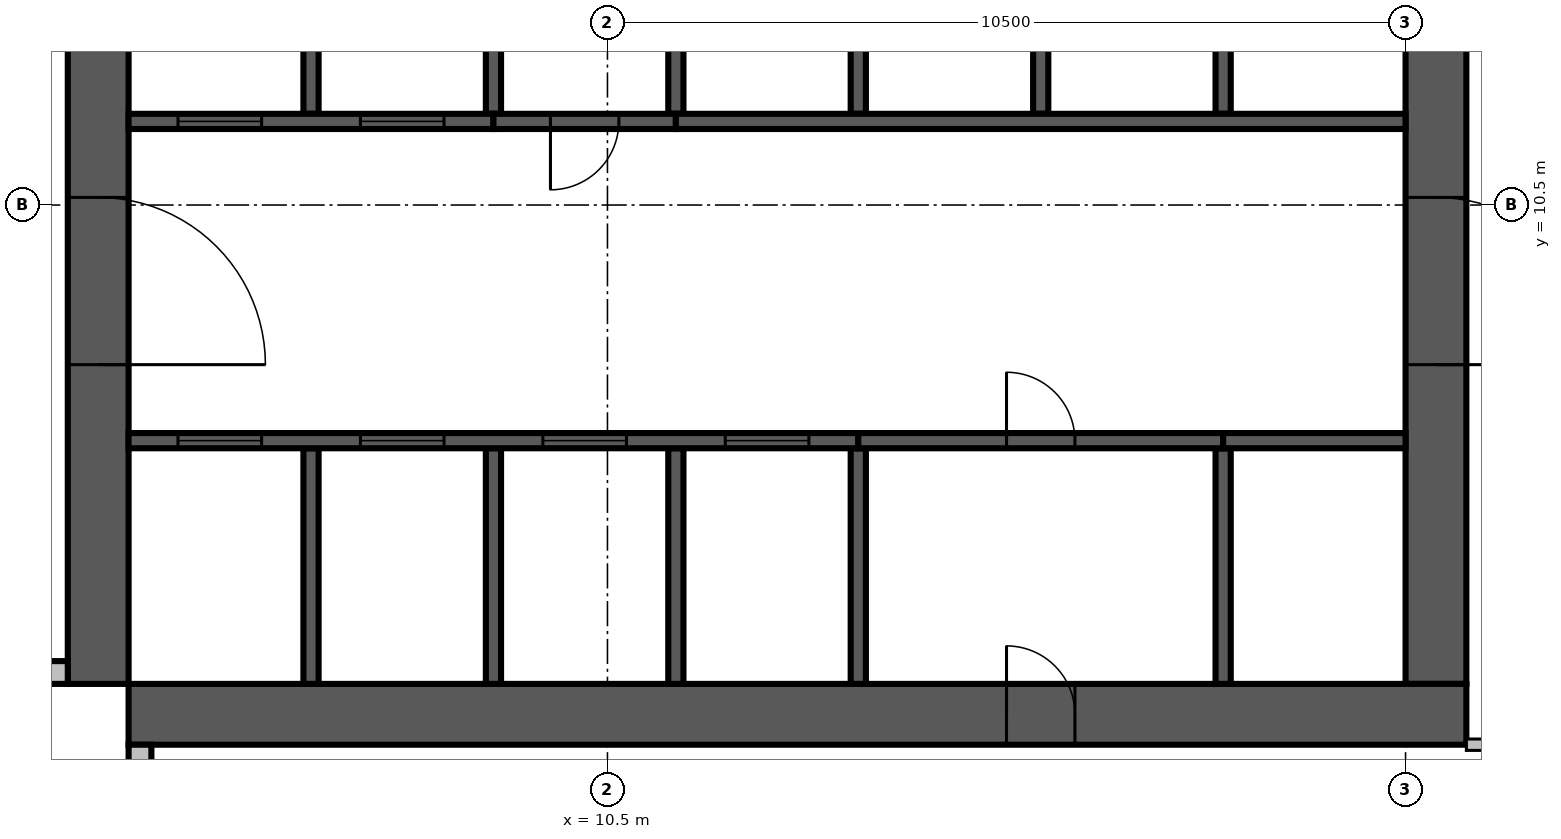
"""IFC4 building model, lengths in metres.
Left out: names, types, materials, properties, quantities, classifications, styles, units other than length and angle.
Written with IfcOpenShell. Run it as: python <this file> out.ifc"""

import sys

from ifc_helpers import new_model, si_unit, direction, frame, frame_2d, origin, place, context, subcontext, project, spatial, rectangle, extrude, source, transform, mapped, element, fill, save


model = new_model("IFC4")
c1 = context("Model", 3, precision=1e-05, world=origin(), true_north=direction((0.0, 1.0)))
c2 = subcontext(c1, "Body", "Model", "MODEL_VIEW")
j1 = project(units=[si_unit("LENGTHUNIT", "METRE"), si_unit("PLANEANGLEUNIT", "RADIAN")], contexts=[c1])
p1 = place(None, origin())
s1 = spatial("IfcSite", under=j1, at=p1, CompositionType="ELEMENT")
p2 = place(p1, origin())
s2 = spatial("IfcBuilding", under=s1, at=p2, CompositionType="ELEMENT")
p3 = place(p2, frame((0.0, 0.0, 250.0)))
s3 = spatial("IfcBuildingStorey", under=s2, at=p3, CompositionType="ELEMENT", Elevation=250.0)
m1 = source(origin(), c2, "Body", "SweptSolid", [
    extrude(rectangle(XDim=17.6, YDim=0.8, at=frame_2d((8.8, 0.0))), origin(), (0.0, 0.0, 1.0), 3.8),
])
p4 = place(p3, frame((3.8, 4.2, 0.0), z_axis=(0.0, 0.0, 1.0), x_axis=(0.0, 1.0, 0.0)))
e1 = element("IfcWall", 1, at=p4, inside=s3, PredefinedType="SHEAR", context=c2, shape_type="MappedRepresentation", body=[
    mapped(m1, transform((0.0, 0.0, 0.0), scale=1.0)),
])
m2 = source(origin(), c2, "Body", "SweptSolid", [
    extrude(rectangle(XDim=2.2, YDim=2.1, at=frame_2d((1.1, 1.05))), frame((0.0, 0.41, 0.0), z_axis=(0.0, -1.0, 0.0), x_axis=(1.0, 0.0, 0.0)), (0.0, 0.0, 1.0), 0.82),
])
p5 = place(p4, frame((4.2, 0.0, 0.0)))
e2 = element("IfcOpeningElement", 2, at=p5, cuts=e1, PredefinedType="OPENING", context=c2, shape_type="MappedRepresentation", body=[
    mapped(m2, transform((0.0, 0.0, 0.0), scale=1.0)),
])
m3 = source(origin(), c2, "Body", "SweptSolid", [
    extrude(rectangle(XDim=0.9, YDim=2.1, at=frame_2d((0.45, 1.05))), frame((0.0, 0.41, 0.0), z_axis=(0.0, -1.0, 0.0), x_axis=(1.0, 0.0, 0.0)), (0.0, 0.0, 1.0), 0.82),
])
p6 = place(p4, frame((10.95, 0.0, 0.0)))
e3 = element("IfcOpeningElement", 3, at=p6, cuts=e1, PredefinedType="OPENING", context=c2, shape_type="MappedRepresentation", body=[
    mapped(m3, transform((0.0, 0.0, 0.0), scale=1.0)),
])
m4 = source(origin(), c2, "Body", "SweptSolid", [
    extrude(rectangle(XDim=16.8, YDim=0.8, at=frame_2d((8.4, 0.0))), origin(), (0.0, 0.0, 1.0), 3.8),
])
p7 = place(p3, frame((21.4, 4.2, 0.0), z_axis=(0.0, 0.0, 1.0), x_axis=(0.0, 1.0, 0.0)))
e4 = element("IfcWall", 4, at=p7, inside=s3, PredefinedType="SHEAR", context=c2, shape_type="MappedRepresentation", body=[
    mapped(m4, transform((0.0, 0.0, 0.0), scale=1.0)),
])
p8 = place(p7, frame((4.2, 0.0, 0.0)))
e5 = element("IfcOpeningElement", 5, at=p8, cuts=e4, PredefinedType="OPENING", context=c2, shape_type="MappedRepresentation", body=[
    mapped(m2, transform((0.0, 0.0, 0.0), scale=1.0)),
])
m5 = source(origin(), c2, "Body", "SweptSolid", [
    extrude(rectangle(XDim=1.2, YDim=2.1, at=frame_2d((0.6, 1.05))), frame((0.0, 0.41, 0.0), z_axis=(0.0, -1.0, 0.0), x_axis=(1.0, 0.0, 0.0)), (0.0, 0.0, 1.0), 0.82),
])
p9 = place(p7, frame((14.7, 0.0, 0.0)))
e6 = element("IfcOpeningElement", 6, at=p9, cuts=e4, PredefinedType="OPENING", context=c2, shape_type="MappedRepresentation", body=[
    mapped(m5, transform((0.0, 0.0, 0.0), scale=1.0)),
])
p10 = place(p3, frame((4.2, 3.8, 0.0), z_axis=(0.0, 0.0, 1.0), x_axis=(1.0, 0.0, 0.0)))
e7 = element("IfcWall", 7, at=p10, inside=s3, PredefinedType="SHEAR", context=c2, shape_type="MappedRepresentation", body=[
    mapped(m1, transform((0.0, 0.0, 0.0), scale=1.0)),
])
p11 = place(p10, frame((11.55, 0.0, 0.0)))
e8 = element("IfcOpeningElement", 8, at=p11, cuts=e7, PredefinedType="OPENING", context=c2, shape_type="MappedRepresentation", body=[
    mapped(m3, transform((0.0, 0.0, 0.0), scale=1.0)),
])
m6 = source(origin(), c2, "Body", "SweptSolid", [
    extrude(rectangle(XDim=3.4, YDim=0.3, at=frame_2d((1.7, 0.0))), origin(), (0.0, 0.0, 1.0), 3.4),
])
p12 = place(p3, frame((0.0, 4.35, 0.0), z_axis=(0.0, 0.0, 1.0), x_axis=(1.0, 0.0, 0.0)))
e9 = element("IfcWall", 9, at=p12, inside=s3, PredefinedType="STANDARD", context=c2, shape_type="MappedRepresentation", body=[
    mapped(m6, transform((0.0, 0.0, 0.0), scale=1.0)),
])
m7 = source(origin(), c2, "Body", "SweptSolid", [
    extrude(rectangle(XDim=1.8, YDim=2.3, at=frame_2d((0.9, 1.15))), frame((0.0, 0.16, 0.0), z_axis=(0.0, -1.0, 0.0), x_axis=(1.0, 0.0, 0.0)), (0.0, 0.0, 1.0), 0.32),
])
p13 = place(p12, frame((1.2, 0.0, 0.6)))
e10 = element("IfcOpeningElement", 10, at=p13, cuts=e9, PredefinedType="OPENING", context=c2, shape_type="MappedRepresentation", body=[
    mapped(m7, transform((0.0, 0.0, 0.0), scale=1.0)),
])
p14 = place(p3, frame((4.35, 3.4, 0.0), z_axis=(0.0, 0.0, 1.0), x_axis=(0.0, -1.0, 0.0)))
e11 = element("IfcWall", 11, at=p14, inside=s3, PredefinedType="STANDARD", context=c2, shape_type="MappedRepresentation", body=[
    mapped(m6, transform((0.0, 0.0, 0.0), scale=1.0)),
])
p15 = place(p14, frame((0.4, 0.0, 0.6)))
e12 = element("IfcOpeningElement", 12, at=p15, cuts=e11, PredefinedType="OPENING", context=c2, shape_type="MappedRepresentation", body=[
    mapped(m7, transform((0.0, 0.0, 0.0), scale=1.0)),
])
m8 = source(origin(), c2, "Body", "SweptSolid", [
    extrude(rectangle(XDim=3.1, YDim=0.2, at=frame_2d((1.55, 0.0))), origin(), (0.0, 0.0, 1.0), 3.8),
])
for number, where, z_axis, x_axis in (
    (13, (6.6, 4.2, 0.0), (0.0, 0.0, 1.0), (0.0, 1.0, 0.0)),
    (14, (9.0, 4.2, 0.0), (0.0, 0.0, 1.0), (0.0, 1.0, 0.0)),
    (15, (11.4, 4.2, 0.0), (0.0, 0.0, 1.0), (0.0, 1.0, 0.0)),
):
    element("IfcWall", number, at=place(p3, frame(where, z_axis=z_axis, x_axis=x_axis)), inside=s3, PredefinedType="SOLIDWALL", context=c2, shape_type="MappedRepresentation", body=[
        mapped(m8, transform((0.0, 0.0, 0.0), scale=1.0)),
    ])
m9 = source(origin(), c2, "Body", "SweptSolid", [
    extrude(rectangle(XDim=3.1, YDim=0.2, at=frame_2d((1.55, 0.0))), origin(), (0.0, 0.0, 1.0), 3.4),
])
for number, where, z_axis, x_axis in (
    (16, (13.8, 4.2, 0.0), (0.0, 0.0, 1.0), (0.0, 1.0, 0.0)),
    (17, (18.6, 4.2, 0.0), (0.0, 0.0, 1.0), (0.0, 1.0, 0.0)),
):
    element("IfcWall", number, at=place(p3, frame(where, z_axis=z_axis, x_axis=x_axis)), inside=s3, PredefinedType="SOLIDWALL", context=c2, shape_type="MappedRepresentation", body=[
        mapped(m9, transform((0.0, 0.0, 0.0), scale=1.0)),
    ])
m10 = source(origin(), c2, "Body", "SweptSolid", [
    extrude(rectangle(XDim=3.0, YDim=0.2, at=frame_2d((1.5, 0.0))), origin(), (0.0, 0.0, 1.0), 3.8),
])
p16 = place(p3, frame((6.6, 11.7, 0.0), z_axis=(0.0, 0.0, 1.0), x_axis=(0.0, 1.0, 0.0)))
e18 = element("IfcWall", 18, at=p16, inside=s3, PredefinedType="SOLIDWALL", context=c2, shape_type="MappedRepresentation", body=[
    mapped(m10, transform((0.0, 0.0, 0.0), scale=1.0)),
])
m11 = source(origin(), c2, "Body", "SweptSolid", [
    extrude(rectangle(XDim=3.0, YDim=0.2, at=frame_2d((1.5, 0.0))), origin(), (0.0, 0.0, 1.0), 3.4),
])
for number, where, z_axis, x_axis in (
    (19, (9.0, 11.7, 0.0), (0.0, 0.0, 1.0), (0.0, 1.0, 0.0)),
    (20, (11.4, 11.7, 0.0), (0.0, 0.0, 1.0), (0.0, 1.0, 0.0)),
):
    element("IfcWall", number, at=place(p3, frame(where, z_axis=z_axis, x_axis=x_axis)), inside=s3, PredefinedType="SOLIDWALL", context=c2, shape_type="MappedRepresentation", body=[
        mapped(m11, transform((0.0, 0.0, 0.0), scale=1.0)),
    ])
for number, where, z_axis, x_axis in (
    (21, (13.8, 11.7, 0.0), (0.0, 0.0, 1.0), (0.0, 1.0, 0.0)),
    (22, (16.2, 11.7, 0.0), (0.0, 0.0, 1.0), (0.0, 1.0, 0.0)),
    (23, (18.6, 11.7, 0.0), (0.0, 0.0, 1.0), (0.0, 1.0, 0.0)),
):
    element("IfcWall", number, at=place(p3, frame(where, z_axis=z_axis, x_axis=x_axis)), inside=s3, PredefinedType="SOLIDWALL", context=c2, shape_type="MappedRepresentation", body=[
        mapped(m10, transform((0.0, 0.0, 0.0), scale=1.0)),
    ])
m12 = source(origin(), c2, "Body", "SweptSolid", [
    extrude(rectangle(XDim=9.6, YDim=0.2, at=frame_2d((4.8, 0.0))), origin(), (0.0, 0.0, 1.0), 3.8),
])
p17 = place(p3, frame((4.2, 7.4, 0.0), z_axis=(0.0, 0.0, 1.0), x_axis=(1.0, 0.0, 0.0)))
e24 = element("IfcWall", 24, at=p17, inside=s3, PredefinedType="SOLIDWALL", context=c2, shape_type="MappedRepresentation", body=[
    mapped(m12, transform((0.0, 0.0, 0.0), scale=1.0)),
])
m13 = source(origin(), c2, "Body", "SweptSolid", [
    extrude(rectangle(XDim=1.1, YDim=2.1, at=frame_2d((0.55, 1.05))), frame((0.0, 0.11, 0.0), z_axis=(0.0, -1.0, 0.0), x_axis=(1.0, 0.0, 0.0)), (0.0, 0.0, 1.0), 0.22),
])
p18 = place(p17, frame((0.65, 0.0, 0.0)))
e25 = element("IfcOpeningElement", 25, at=p18, cuts=e24, PredefinedType="OPENING", context=c2, shape_type="MappedRepresentation", body=[
    mapped(m13, transform((0.0, 0.0, 0.0), scale=1.0)),
])
p19 = place(p17, frame((3.05, 0.0, 0.0)))
e26 = element("IfcOpeningElement", 26, at=p19, cuts=e24, PredefinedType="OPENING", context=c2, shape_type="MappedRepresentation", body=[
    mapped(m13, transform((0.0, 0.0, 0.0), scale=1.0)),
])
p20 = place(p17, frame((5.45, 0.0, 0.0)))
e27 = element("IfcOpeningElement", 27, at=p20, cuts=e24, PredefinedType="OPENING", context=c2, shape_type="MappedRepresentation", body=[
    mapped(m13, transform((0.0, 0.0, 0.0), scale=1.0)),
])
p21 = place(p17, frame((7.85, 0.0, 0.0)))
e28 = element("IfcOpeningElement", 28, at=p21, cuts=e24, PredefinedType="OPENING", context=c2, shape_type="MappedRepresentation", body=[
    mapped(m13, transform((0.0, 0.0, 0.0), scale=1.0)),
])
m14 = source(origin(), c2, "Body", "SweptSolid", [
    extrude(rectangle(XDim=4.8, YDim=0.2, at=frame_2d((2.4, 0.0))), origin(), (0.0, 0.0, 1.0), 3.4),
])
p22 = place(p3, frame((13.8, 7.4, 0.0), z_axis=(0.0, 0.0, 1.0), x_axis=(1.0, 0.0, 0.0)))
e29 = element("IfcWall", 29, at=p22, inside=s3, PredefinedType="SOLIDWALL", context=c2, shape_type="MappedRepresentation", body=[
    mapped(m14, transform((0.0, 0.0, 0.0), scale=1.0)),
])
m15 = source(origin(), c2, "Body", "SweptSolid", [
    extrude(rectangle(XDim=0.9, YDim=2.1, at=frame_2d((0.45, 1.05))), frame((0.0, 0.11, 0.0), z_axis=(0.0, -1.0, 0.0), x_axis=(1.0, 0.0, 0.0)), (0.0, 0.0, 1.0), 0.22),
])
p23 = place(p22, frame((1.95, 0.0, 0.0)))
e30 = element("IfcOpeningElement", 30, at=p23, cuts=e29, PredefinedType="OPENING", context=c2, shape_type="MappedRepresentation", body=[
    mapped(m15, transform((0.0, 0.0, 0.0), scale=1.0)),
])
m16 = source(origin(), c2, "Body", "SweptSolid", [
    extrude(rectangle(XDim=2.4, YDim=0.2, at=frame_2d((1.2, 0.0))), origin(), (0.0, 0.0, 1.0), 3.8),
])
p24 = place(p3, frame((18.6, 7.4, 0.0), z_axis=(0.0, 0.0, 1.0), x_axis=(1.0, 0.0, 0.0)))
e31 = element("IfcWall", 31, at=p24, inside=s3, PredefinedType="SOLIDWALL", context=c2, shape_type="MappedRepresentation", body=[
    mapped(m16, transform((0.0, 0.0, 0.0), scale=1.0)),
])
m17 = source(origin(), c2, "Body", "SweptSolid", [
    extrude(rectangle(XDim=4.8, YDim=0.2, at=frame_2d((2.4, 0.0))), origin(), (0.0, 0.0, 1.0), 3.8),
])
p25 = place(p3, frame((4.2, 11.6, 0.0), z_axis=(0.0, 0.0, 1.0), x_axis=(1.0, 0.0, 0.0)))
e32 = element("IfcWall", 32, at=p25, inside=s3, PredefinedType="SOLIDWALL", context=c2, shape_type="MappedRepresentation", body=[
    mapped(m17, transform((0.0, 0.0, 0.0), scale=1.0)),
])
p26 = place(p25, frame((0.65, 0.0, 0.0)))
e33 = element("IfcOpeningElement", 33, at=p26, cuts=e32, PredefinedType="OPENING", context=c2, shape_type="MappedRepresentation", body=[
    mapped(m13, transform((0.0, 0.0, 0.0), scale=1.0)),
])
p27 = place(p25, frame((3.05, 0.0, 0.0)))
e34 = element("IfcOpeningElement", 34, at=p27, cuts=e32, PredefinedType="OPENING", context=c2, shape_type="MappedRepresentation", body=[
    mapped(m13, transform((0.0, 0.0, 0.0), scale=1.0)),
])
m18 = source(origin(), c2, "Body", "SweptSolid", [
    extrude(rectangle(XDim=2.4, YDim=0.2, at=frame_2d((1.2, 0.0))), origin(), (0.0, 0.0, 1.0), 3.4),
])
p28 = place(p3, frame((9.0, 11.6, 0.0), z_axis=(0.0, 0.0, 1.0), x_axis=(1.0, 0.0, 0.0)))
e35 = element("IfcWall", 35, at=p28, inside=s3, PredefinedType="SOLIDWALL", context=c2, shape_type="MappedRepresentation", body=[
    mapped(m18, transform((0.0, 0.0, 0.0), scale=1.0)),
])
p29 = place(p28, frame((0.75, 0.0, 0.0)))
e36 = element("IfcOpeningElement", 36, at=p29, cuts=e35, PredefinedType="OPENING", context=c2, shape_type="MappedRepresentation", body=[
    mapped(m15, transform((0.0, 0.0, 0.0), scale=1.0)),
])
p30 = place(p3, frame((11.4, 11.6, 0.0), z_axis=(0.0, 0.0, 1.0), x_axis=(1.0, 0.0, 0.0)))
e37 = element("IfcWall", 37, at=p30, inside=s3, PredefinedType="SOLIDWALL", context=c2, shape_type="MappedRepresentation", body=[
    mapped(m12, transform((0.0, 0.0, 0.0), scale=1.0)),
])
m19 = source(origin(), c2, "Body", "SweptSolid", [
    extrude(rectangle(XDim=7.525, YDim=0.15, at=frame_2d((3.763, 0.0))), origin(), (0.0, 0.0, 1.0), 3.4),
])
p31 = place(p3, frame((21.8, 3.4, 0.0), z_axis=(0.0, 0.0, 1.0), x_axis=(1.0, 0.0, 0.0)))
e38 = element("IfcWall", 38, at=p31, inside=s3, PredefinedType="PARTITIONING", context=c2, shape_type="MappedRepresentation", body=[
    mapped(m19, transform((0.0, 0.0, 0.0), scale=1.0)),
])
m20 = source(origin(), c2, "Body", "SweptSolid", [
    extrude(rectangle(XDim=1.0, YDim=2.1, at=frame_2d((0.5, 1.05))), frame((0.0, 0.085, 0.0), z_axis=(0.0, -1.0, 0.0), x_axis=(1.0, 0.0, 0.0)), (0.0, 0.0, 1.0), 0.17),
])
p32 = place(p31, frame((3.0, 0.0, 0.0)))
e39 = element("IfcOpeningElement", 39, at=p32, cuts=e38, PredefinedType="OPENING", context=c2, shape_type="MappedRepresentation", body=[
    mapped(m20, transform((0.0, 0.0, 0.0), scale=1.0)),
])
m21 = source(origin(), c2, "Body", "SweptSolid", [
    extrude(rectangle(XDim=0.9, YDim=2.1, at=frame_2d((0.45, 1.05))), frame((0.0, 0.085, 0.0), z_axis=(0.0, -1.0, 0.0), x_axis=(1.0, 0.0, 0.0)), (0.0, 0.0, 1.0), 0.17),
])
p33 = place(p31, frame((4.413, 0.0, 0.0)))
e40 = element("IfcOpeningElement", 40, at=p33, cuts=e38, PredefinedType="OPENING", context=c2, shape_type="MappedRepresentation", body=[
    mapped(m21, transform((0.0, 0.0, 0.0), scale=1.0)),
])
m22 = source(origin(), c2, "Body", "SweptSolid", [
    extrude(rectangle(XDim=1.1, YDim=2.1, at=frame_2d((0.55, 1.05))), frame((0.0, 0.025, 0.0), z_axis=(0.0, -1.0, 0.0), x_axis=(1.0, 0.0, 0.0)), (0.0, 0.0, 1.0), 0.05),
])
p34 = place(p18, origin())
e41 = element("IfcDoor", 41, at=p34, inside=s3, OperationType="SLIDING_TO_LEFT", PredefinedType="DOOR", context=c2, shape_type="MappedRepresentation", body=[
    mapped(m22, transform((0.0, 0.0, 0.0), scale=1.0)),
])
fill(e25, e41)
p35 = place(p19, origin())
e42 = element("IfcDoor", 42, at=p35, inside=s3, OperationType="SLIDING_TO_LEFT", PredefinedType="DOOR", context=c2, shape_type="MappedRepresentation", body=[
    mapped(m22, transform((0.0, 0.0, 0.0), scale=1.0)),
])
fill(e26, e42)
p36 = place(p20, origin())
e43 = element("IfcDoor", 43, at=p36, inside=s3, OperationType="SLIDING_TO_LEFT", PredefinedType="DOOR", context=c2, shape_type="MappedRepresentation", body=[
    mapped(m22, transform((0.0, 0.0, 0.0), scale=1.0)),
])
fill(e27, e43)
p37 = place(p21, origin())
e44 = element("IfcDoor", 44, at=p37, inside=s3, OperationType="SLIDING_TO_LEFT", PredefinedType="DOOR", context=c2, shape_type="MappedRepresentation", body=[
    mapped(m22, transform((0.0, 0.0, 0.0), scale=1.0)),
])
fill(e28, e44)
m23 = source(origin(), c2, "Body", "SweptSolid", [
    extrude(rectangle(XDim=0.9, YDim=2.1, at=frame_2d((0.45, 1.05))), frame((0.0, 0.025, 0.0), z_axis=(0.0, -1.0, 0.0), x_axis=(1.0, 0.0, 0.0)), (0.0, 0.0, 1.0), 0.05),
])
p38 = place(p23, origin())
e45 = element("IfcDoor", 45, at=p38, inside=s3, OperationType="SINGLE_SWING_LEFT", PredefinedType="DOOR", context=c2, shape_type="MappedRepresentation", body=[
    mapped(m23, transform((0.0, 0.0, 0.0), scale=1.0)),
])
fill(e30, e45)
p39 = place(p26, origin())
e46 = element("IfcDoor", 46, at=p39, inside=s3, OperationType="SLIDING_TO_LEFT", PredefinedType="DOOR", context=c2, shape_type="MappedRepresentation", body=[
    mapped(m22, transform((0.0, 0.0, 0.0), scale=1.0)),
])
fill(e33, e46)
p40 = place(p27, origin())
e47 = element("IfcDoor", 47, at=p40, inside=s3, OperationType="SLIDING_TO_LEFT", PredefinedType="DOOR", context=c2, shape_type="MappedRepresentation", body=[
    mapped(m22, transform((0.0, 0.0, 0.0), scale=1.0)),
])
fill(e34, e47)
p41 = place(p29, origin())
e48 = element("IfcDoor", 48, at=p41, inside=s3, OperationType="SINGLE_SWING_RIGHT", PredefinedType="DOOR", context=c2, shape_type="MappedRepresentation", body=[
    mapped(m23, transform((0.0, 0.0, 0.0), scale=1.0)),
])
fill(e36, e48)
m24 = source(origin(), c2, "Body", "SweptSolid", [
    extrude(rectangle(XDim=2.2, YDim=2.1, at=frame_2d((1.1, 1.05))), frame((0.0, 0.025, 0.0), z_axis=(0.0, -1.0, 0.0), x_axis=(1.0, 0.0, 0.0)), (0.0, 0.0, 1.0), 0.05),
])
p42 = place(p8, origin())
e49 = element("IfcDoor", 49, at=p42, inside=s3, OperationType="DOUBLE_DOOR_SINGLE_SWING", PredefinedType="DOOR", context=c2, shape_type="MappedRepresentation", body=[
    mapped(m24, transform((0.0, 0.0, 0.0), scale=1.0)),
])
fill(e5, e49)
p43 = place(p5, origin())
e50 = element("IfcDoor", 50, at=p43, inside=s3, OperationType="DOUBLE_DOOR_SINGLE_SWING", PredefinedType="DOOR", context=c2, shape_type="MappedRepresentation", body=[
    mapped(m24, transform((0.0, 0.0, 0.0), scale=1.0)),
])
fill(e2, e50)
p44 = place(p11, origin())
e51 = element("IfcDoor", 51, at=p44, inside=s3, OperationType="SINGLE_SWING_LEFT", PredefinedType="DOOR", context=c2, shape_type="MappedRepresentation", body=[
    mapped(m23, transform((0.0, 0.0, 0.0), scale=1.0)),
])
fill(e8, e51)
save(model, sys.argv[1])
